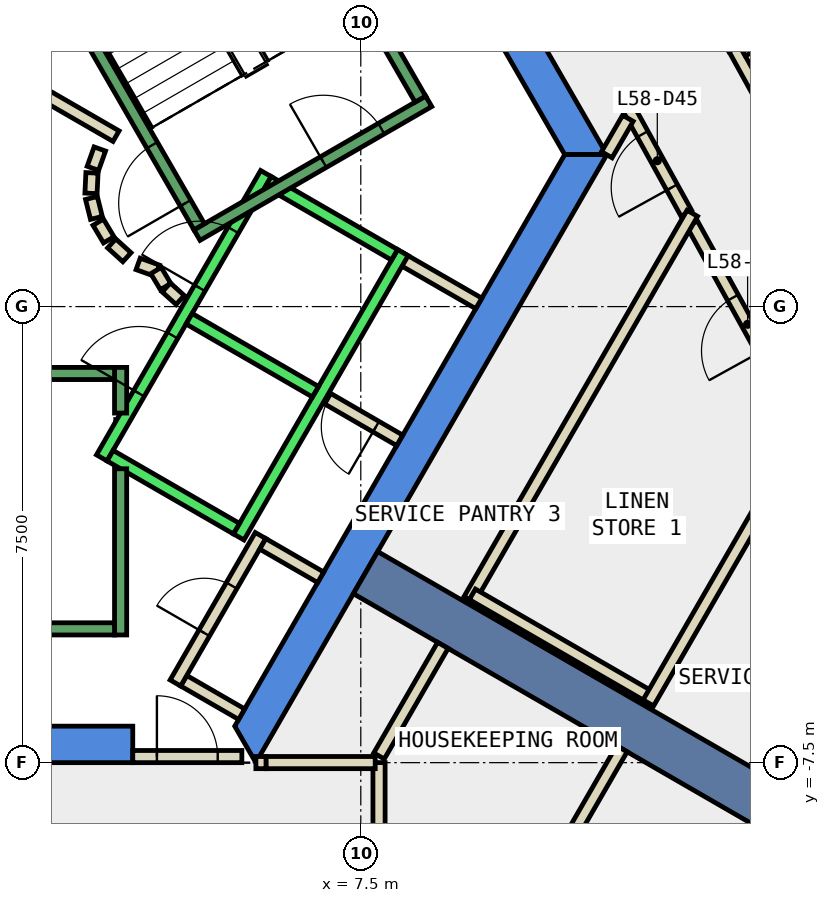
"""IFC4 building model, lengths in metres.
Left out: names, types, materials, properties, quantities, classifications, styles, units other than length and angle.
Written with IfcOpenShell. Run it as: python <this file> out.ifc"""

import sys

from ifc_helpers import new_model, si_unit, direction, frame, frame_2d, origin, place, context, subcontext, project, spatial, polyline, rectangle, outline, extrude, element, fill, save


model = new_model("IFC4")
c1 = context("Model", 3, precision=1e-05, world=origin(), true_north=direction((0.0, 1.0)))
c2 = subcontext(c1, "Body", "Model", "MODEL_VIEW")
j1 = project(units=[si_unit("LENGTHUNIT", "METRE"), si_unit("PLANEANGLEUNIT", "RADIAN")], contexts=[c1])
p1 = place(None, origin())
s1 = spatial("IfcSite", under=j1, at=p1, CompositionType="ELEMENT")
p2 = place(p1, origin())
s2 = spatial("IfcBuilding", under=s1, at=p2, CompositionType="ELEMENT")
p3 = place(p2, frame((0.0, 0.0, 255.8)))
s3 = spatial("IfcBuildingStorey", under=s2, at=p3, CompositionType="ELEMENT", Elevation=255.8)
p4 = place(p3, frame((0.0, 0.0, -0.34)))
e1 = element("IfcWall", 1, at=p4, inside=s3, PredefinedType="SHEAR", context=c2, shape_type="SweptSolid", body=[
    extrude(outline(polyline([(6.786, 10.747), (6.266, 10.447), (10.854, 2.5), (11.547, 2.5), (6.786, 10.747)])), origin(), (0.0, 0.0, 1.0), 3.6),
])
p5 = place(p3, frame((0.0, 0.0, -0.34)))
e2 = element("IfcWall", 2, at=p5, inside=s3, PredefinedType="SHEAR", context=c2, shape_type="SweptSolid", body=[
    extrude(outline(polyline([(3.75, -7.5), (3.75, -6.9), (-5.427, -6.9), (-5.774, -7.5), (3.75, -7.5)])), origin(), (0.0, 0.0, 1.0), 3.6),
])
p6 = place(p3, frame((0.0, 0.0, -0.34)))
e3 = element("IfcWall", 3, at=p6, inside=s3, PredefinedType="SHEAR", context=c2, shape_type="SweptSolid", body=[
    extrude(outline(polyline([(5.774, -7.5), (11.547, 2.5), (10.854, 2.5), (5.427, -6.9), (5.774, -7.5)])), origin(), (0.0, 0.0, 1.0), 3.6),
])
p7 = place(p3, frame((7.578, -4.375, -0.34), z_axis=(0.0, 0.0, 1.0), x_axis=(0.866024315419, -0.5000018851, 0.0)))
e4 = element("IfcWall", 4, at=p7, inside=s3, PredefinedType="SHEAR", context=c2, shape_type="SweptSolid", body=[
    extrude(rectangle(XDim=9.0, YDim=0.8, at=frame_2d((4.5, 0.0))), origin(), (0.0, 0.0, 1.0), 3.6),
])
p8 = place(p3, frame((12.854, 1.535, 0.0), z_axis=(0.0, 0.0, 1.0), x_axis=(-0.483730980407, 0.875216738068, 0.0)))
e5 = element("IfcWall", 5, at=p8, inside=s3, PredefinedType="PARTITIONING", context=c2, shape_type="SweptSolid", body=[
    extrude(rectangle(XDim=1.974, YDim=0.2, at=frame_2d((0.987, 0.0))), origin(), (0.0, 0.0, 1.0), 3.26),
])
p9 = place(p8, frame((0.487, 0.0, 0.0)))
e6 = element("IfcOpeningElement", 6, at=p9, cuts=e5, PredefinedType="OPENING", context=c2, shape_type="SweptSolid", body=[
    extrude(rectangle(XDim=1.0, YDim=2.1, at=frame_2d((0.5, 1.05))), frame((0.0, 0.11, 0.0), z_axis=(0.0, -1.0, 0.0), x_axis=(1.0, 0.0, 0.0)), (0.0, 0.0, 1.0), 0.22),
])
p10 = place(p3, frame((11.893, 3.097, 0.0), z_axis=(0.0, 0.0, 1.0), x_axis=(-0.500911294014, -0.865498628265, 0.0)))
e7 = element("IfcWall", 7, at=p10, inside=s3, PredefinedType="PARTITIONING", context=c2, shape_type="SweptSolid", body=[
    extrude(rectangle(XDim=0.693, YDim=0.2, at=frame_2d((0.347, 0.0))), origin(), (0.0, 0.0, 1.0), 3.26),
])
p11 = place(p3, frame((14.773, -1.941, 0.0), z_axis=(0.0, 0.0, 1.0), x_axis=(-0.483431586589, 0.875382145744, 0.0)))
e8 = element("IfcWall", 8, at=p11, inside=s3, PredefinedType="PARTITIONING", context=c2, shape_type="SweptSolid", body=[
    extrude(rectangle(XDim=3.771, YDim=0.2, at=frame_2d((1.885, 0.0))), origin(), (0.0, 0.0, 1.0), 3.26),
])
p12 = place(p11, frame((1.385, 0.0, 0.0)))
e9 = element("IfcOpeningElement", 9, at=p12, cuts=e8, PredefinedType="OPENING", context=c2, shape_type="SweptSolid", body=[
    extrude(rectangle(XDim=1.0, YDim=2.1, at=frame_2d((0.5, 1.05))), frame((0.0, 0.11, 0.0), z_axis=(0.0, -1.0, 0.0), x_axis=(1.0, 0.0, 0.0)), (0.0, 0.0, 1.0), 0.22),
])
p13 = place(p3, frame((13.641, 4.246, 0.0), z_axis=(0.0, 0.0, 1.0), x_axis=(0.483405752983, -0.875396411909, 0.0)))
e10 = element("IfcWall", 10, at=p13, inside=s3, PredefinedType="PARTITIONING", context=c2, shape_type="SweptSolid", body=[
    extrude(rectangle(XDim=4.284, YDim=0.2, at=frame_2d((2.142, 0.0))), origin(), (0.0, 0.0, 1.0), 3.26),
])
p14 = place(p13, frame((1.692, 0.0, 0.0)))
e11 = element("IfcOpeningElement", 11, at=p14, cuts=e10, PredefinedType="OPENING", context=c2, shape_type="SweptSolid", body=[
    extrude(rectangle(XDim=1.0, YDim=2.1, at=frame_2d((0.5, 1.05))), frame((0.0, 0.11, 0.0), z_axis=(0.0, -1.0, 0.0), x_axis=(1.0, 0.0, 0.0)), (0.0, 0.0, 1.0), 0.22),
])
p15 = place(p3, frame((5.541, -6.703, 0.0), z_axis=(0.0, 0.0, 1.0), x_axis=(-0.86621513555, 0.499671230855, 0.0)))
e12 = element("IfcWall", 12, at=p15, inside=s3, PredefinedType="PARTITIONING", context=c2, shape_type="SweptSolid", body=[
    extrude(rectangle(XDim=1.1, YDim=0.2, at=frame_2d((0.55, 0.0))), origin(), (0.0, 0.0, 1.0), 3.26),
])
p16 = place(p3, frame((4.451, -6.19, 0.0), z_axis=(0.0, 0.0, 1.0), x_axis=(0.500011755427, 0.866018616679, 0.0)))
e13 = element("IfcWall", 13, at=p16, inside=s3, PredefinedType="PARTITIONING", context=c2, shape_type="SweptSolid", body=[
    extrude(rectangle(XDim=2.8, YDim=0.2, at=frame_2d((1.4, 0.0))), origin(), (0.0, 0.0, 1.0), 3.26),
])
p17 = place(p16, frame((0.95, 0.0, 0.0)))
e14 = element("IfcOpeningElement", 14, at=p17, cuts=e13, PredefinedType="OPENING", context=c2, shape_type="SweptSolid", body=[
    extrude(rectangle(XDim=0.9, YDim=2.1, at=frame_2d((0.45, 1.05))), frame((0.0, 0.11, 0.0), z_axis=(0.0, -1.0, 0.0), x_axis=(1.0, 0.0, 0.0)), (0.0, 0.0, 1.0), 0.22),
])
p18 = place(p3, frame((5.888, -3.902, 0.0), z_axis=(0.0, 0.0, 1.0), x_axis=(0.86621513555, -0.499671230855, 0.0)))
e15 = element("IfcWall", 15, at=p18, inside=s3, PredefinedType="PARTITIONING", context=c2, shape_type="SweptSolid", body=[
    extrude(rectangle(XDim=1.1, YDim=0.2, at=frame_2d((0.55, 0.0))), origin(), (0.0, 0.0, 1.0), 3.26),
])
p19 = place(p3, frame((8.14, -2.2, 0.0), z_axis=(0.0, 0.0, 1.0), x_axis=(-0.865545166185, 0.500830874941, 0.0)))
e16 = element("IfcWall", 16, at=p19, inside=s3, PredefinedType="PARTITIONING", context=c2, shape_type="SweptSolid", body=[
    extrude(rectangle(XDim=1.5, YDim=0.2, at=frame_2d((0.75, 0.0))), origin(), (0.0, 0.0, 1.0), 3.26),
])
p20 = place(p19, frame((0.45, 0.0, 0.0)))
e17 = element("IfcOpeningElement", 17, at=p20, cuts=e16, PredefinedType="OPENING", context=c2, shape_type="SweptSolid", body=[
    extrude(rectangle(XDim=0.9, YDim=2.1, at=frame_2d((0.45, 1.05))), frame((0.0, 0.11, 0.0), z_axis=(0.0, -1.0, 0.0), x_axis=(1.0, 0.0, 0.0)), (0.0, 0.0, 1.0), 0.22),
])
p21 = place(p3, frame((8.141, 0.801, 0.0), z_axis=(0.0, 0.0, 1.0), x_axis=(0.866434738017, -0.499290341141, 0.0)))
e18 = element("IfcWall", 18, at=p21, inside=s3, PredefinedType="PARTITIONING", context=c2, shape_type="SweptSolid", body=[
    extrude(rectangle(XDim=1.5, YDim=0.2, at=frame_2d((0.75, 0.0))), origin(), (0.0, 0.0, 1.0), 3.26),
])
p22 = place(p3, frame((5.775, -7.499, 0.0), z_axis=(0.0, 0.0, 1.0), x_axis=(1.0, 0.0, 0.0)))
e19 = element("IfcWall", 19, at=p22, inside=s3, PredefinedType="PARTITIONING", context=c2, shape_type="SweptSolid", body=[
    extrude(rectangle(XDim=0.169, YDim=0.2, at=frame_2d((0.084, 0.0))), origin(), (0.0, 0.0, 1.0), 2.4),
])
p23 = place(p3, frame((7.8, -7.39, 0.0), z_axis=(0.0, 0.0, 1.0), x_axis=(0.499977374825, 0.866038466041, 0.0)))
e20 = element("IfcWall", 20, at=p23, inside=s3, PredefinedType="PARTITIONING", context=c2, shape_type="SweptSolid", body=[
    extrude(rectangle(XDim=2.1, YDim=0.2, at=frame_2d((1.05, 0.0))), origin(), (0.0, 0.0, 1.0), 3.26),
])
p24 = place(p3, frame((9.285, -4.818, 0.0), z_axis=(0.0, 0.0, 1.0), x_axis=(0.499962569651, 0.866047013128, 0.0)))
e21 = element("IfcWall", 21, at=p24, inside=s3, PredefinedType="PARTITIONING", context=c2, shape_type="SweptSolid", body=[
    extrude(rectangle(XDim=7.334, YDim=0.2, at=frame_2d((3.667, 0.0))), origin(), (0.0, 0.0, 1.0), 3.26),
])
p25 = place(p3, frame((1.866, 3.732, 0.0), z_axis=(0.0, 0.0, 1.0), x_axis=(0.866043361281, -0.499968895414, 0.0)))
e22 = element("IfcWall", 22, at=p25, inside=s3, PredefinedType="PARTITIONING", context=c2, shape_type="SweptSolid", body=[
    extrude(rectangle(XDim=1.858, YDim=0.2, at=frame_2d((0.929, 0.0))), origin(), (0.0, 0.0, 1.0), 3.26),
])
p26 = place(p3, frame((3.208, 2.592, 0.0), z_axis=(0.0, 0.0, 1.0), x_axis=(-0.337388820924, -0.941365382578, 0.0)))
e23 = element("IfcWall", 23, at=p26, inside=s3, PredefinedType="PARTITIONING", context=c2, shape_type="SweptSolid", body=[
    extrude(rectangle(XDim=0.338, YDim=0.2, at=frame_2d((0.169, 0.0))), origin(), (0.0, 0.0, 1.0), 3.26),
])
p27 = place(p3, frame((3.079, 2.199, 0.0), z_axis=(0.0, 0.0, 1.0), x_axis=(-0.047771483479, -0.998858290933, 0.0)))
e24 = element("IfcWall", 24, at=p27, inside=s3, PredefinedType="PARTITIONING", context=c2, shape_type="SweptSolid", body=[
    extrude(rectangle(XDim=0.337, YDim=0.2, at=frame_2d((0.169, 0.0))), origin(), (0.0, 0.0, 1.0), 3.26),
])
p28 = place(p3, frame((3.07, 1.786, 0.0), z_axis=(0.0, 0.0, 1.0), x_axis=(0.242705583207, -0.970099994784, 0.0)))
e25 = element("IfcWall", 25, at=p28, inside=s3, PredefinedType="PARTITIONING", context=c2, shape_type="SweptSolid", body=[
    extrude(rectangle(XDim=0.338, YDim=0.2, at=frame_2d((0.169, 0.0))), origin(), (0.0, 0.0, 1.0), 3.26),
])
for number, where, z_axis, x_axis in (
    (26, (3.182, 1.388, 0.0), (0.0, 0.0, 1.0), (0.512, -0.859, 0.0)),
    (27, (3.404, 1.039, 0.0), (0.0, 0.0, 1.0), (0.74, -0.672, 0.0)),
):
    element("IfcWall", number, at=place(p3, frame(where, z_axis=z_axis, x_axis=x_axis)), inside=s3, PredefinedType="PARTITIONING", context=c2, shape_type="SweptSolid", body=[
        extrude(rectangle(XDim=0.338, YDim=0.2, at=frame_2d((0.169, 0.0))), origin(), (0.0, 0.0, 1.0), 3.26),
    ])
p29 = place(p3, frame((3.838, 0.702, 0.0), z_axis=(0.0, 0.0, 1.0), x_axis=(0.941035081519, -0.338308993895, 0.0)))
e28 = element("IfcWall", 28, at=p29, inside=s3, PredefinedType="PARTITIONING", context=c2, shape_type="SweptSolid", body=[
    extrude(rectangle(XDim=0.337, YDim=0.2, at=frame_2d((0.168, 0.0))), origin(), (0.0, 0.0, 1.0), 3.26),
])
p30 = place(p3, frame((4.132, 0.593, 0.0), z_axis=(0.0, 0.0, 1.0), x_axis=(0.513561617048, -0.858052717201, 0.0)))
e29 = element("IfcWall", 29, at=p30, inside=s3, PredefinedType="PARTITIONING", context=c2, shape_type="SweptSolid", body=[
    extrude(rectangle(XDim=0.308, YDim=0.2, at=frame_2d((0.154, 0.0))), origin(), (0.0, 0.0, 1.0), 3.26),
])
p31 = place(p3, frame((4.301, 0.315, 0.0), z_axis=(0.0, 0.0, 1.0), x_axis=(0.741798017506, -0.670623367639, 0.0)))
e30 = element("IfcWall", 30, at=p31, inside=s3, PredefinedType="PARTITIONING", context=c2, shape_type="SweptSolid", body=[
    extrude(rectangle(XDim=0.309, YDim=0.2, at=frame_2d((0.154, 0.0))), origin(), (0.0, 0.0, 1.0), 3.26),
])
p32 = place(p3, frame((7.8, -7.499, 0.0), z_axis=(0.0, 0.0, 1.0), x_axis=(0.0, -1.0, 0.0)))
e31 = element("IfcWall", 31, at=p32, inside=s3, PredefinedType="PARTITIONING", context=c2, shape_type="SweptSolid", body=[
    extrude(rectangle(XDim=4.685, YDim=0.2, at=frame_2d((2.343, 0.0))), origin(), (0.0, 0.0, 1.0), 3.26),
])
p33 = place(p32, frame((1.842, 0.0, 0.0)))
e32 = element("IfcOpeningElement", 32, at=p33, cuts=e31, PredefinedType="OPENING", context=c2, shape_type="SweptSolid", body=[
    extrude(rectangle(XDim=1.0, YDim=2.1, at=frame_2d((0.5, 1.05))), frame((0.0, 0.11, 0.0), z_axis=(0.0, -1.0, 0.0), x_axis=(1.0, 0.0, 0.0)), (0.0, 0.0, 1.0), 0.22),
])
p34 = place(p3, frame((9.335, -4.732, 0.0), z_axis=(0.0, 0.0, 1.0), x_axis=(0.866002606077, -0.500039484709, 0.0)))
e33 = element("IfcWall", 33, at=p34, inside=s3, PredefinedType="PARTITIONING", context=c2, shape_type="SweptSolid", body=[
    extrude(rectangle(XDim=3.4, YDim=0.2, at=frame_2d((1.7, 0.0))), origin(), (0.0, 0.0, 1.0), 3.26),
])
p35 = place(p3, frame((11.794, -7.271, 0.0), z_axis=(0.0, 0.0, 1.0), x_axis=(-0.499918457185, -0.866072477433, 0.0)))
e34 = element("IfcWall", 34, at=p35, inside=s3, PredefinedType="PARTITIONING", context=c2, shape_type="SweptSolid", body=[
    extrude(rectangle(XDim=5.607, YDim=0.2, at=frame_2d((2.803, 0.0))), origin(), (0.0, 0.0, 1.0), 3.26),
])
p36 = place(p3, frame((14.871, -1.942, 0.0), z_axis=(0.0, 0.0, 1.0), x_axis=(-0.50000507839, -0.866022471755, 0.0)))
e35 = element("IfcWall", 35, at=p36, inside=s3, PredefinedType="PARTITIONING", context=c2, shape_type="SweptSolid", body=[
    extrude(rectangle(XDim=5.284, YDim=0.2, at=frame_2d((2.642, 0.0))), origin(), (0.0, 0.0, 1.0), 3.26),
])
p37 = place(p3, frame((13.776, 4.208, 0.0), z_axis=(0.0, 0.0, 1.0), x_axis=(0.870669592898, 0.491868336044, 0.0)))
e36 = element("IfcWall", 36, at=p37, inside=s3, PredefinedType="PARTITIONING", context=c2, shape_type="SweptSolid", body=[
    extrude(rectangle(XDim=2.3, YDim=0.2, at=frame_2d((1.15, 0.0))), origin(), (0.0, 0.0, 1.0), 3.26),
])
p38 = place(p3, frame((3.75, -7.4, 0.0), z_axis=(0.0, 0.0, 1.0), x_axis=(1.0, 0.0, 0.0)))
e37 = element("IfcWall", 37, at=p38, inside=s3, PredefinedType="PARTITIONING", context=c2, shape_type="SweptSolid", body=[
    extrude(rectangle(XDim=1.794, YDim=0.2, at=frame_2d((0.897, 0.0))), origin(), (0.0, 0.0, 1.0), 2.4),
])
p39 = place(p38, frame((0.397, 0.0, 0.0)))
e38 = element("IfcOpeningElement", 38, at=p39, cuts=e37, PredefinedType="OPENING", context=c2, shape_type="SweptSolid", body=[
    extrude(rectangle(XDim=1.0, YDim=2.1, at=frame_2d((0.5, 1.05))), frame((0.0, 0.11, 0.0), z_axis=(0.0, -1.0, 0.0), x_axis=(1.0, 0.0, 0.0)), (0.0, 0.0, 1.0), 0.22),
])
p40 = place(p3, frame((5.944, -7.499, 0.0), z_axis=(0.0, 0.0, 1.0), x_axis=(1.0, 0.0, 0.0)))
e39 = element("IfcWall", 39, at=p40, inside=s3, PredefinedType="PARTITIONING", context=c2, shape_type="SweptSolid", body=[
    extrude(rectangle(XDim=1.793, YDim=0.2, at=frame_2d((0.896, 0.0))), origin(), (0.0, 0.0, 1.0), 3.26),
])
p41 = place(p3, frame((3.24, -2.488, 0.0), z_axis=(0.0, 0.0, 1.0), x_axis=(0.500034260056, 0.866005622828, 0.0)))
e40 = element("IfcWall", 40, at=p41, inside=s3, PredefinedType="STANDARD", context=c2, shape_type="SweptSolid", body=[
    extrude(rectangle(XDim=5.399, YDim=0.2, at=frame_2d((2.7, 0.0))), origin(), (0.0, 0.0, 1.0), 3.26),
])
p42 = place(p41, frame((3.225, 0.0, 0.0)))
e41 = element("IfcOpeningElement", 41, at=p42, cuts=e40, PredefinedType="OPENING", context=c2, shape_type="SweptSolid", body=[
    extrude(rectangle(XDim=1.1, YDim=2.1, at=frame_2d((0.55, 1.05))), frame((0.0, 0.11, 0.0), z_axis=(0.0, -1.0, 0.0), x_axis=(1.0, 0.0, 0.0)), (0.0, 0.0, 1.0), 0.22),
])
p43 = place(p41, frame((1.225, 0.0, 0.0)))
e42 = element("IfcOpeningElement", 42, at=p43, cuts=e40, PredefinedType="OPENING", context=c2, shape_type="SweptSolid", body=[
    extrude(rectangle(XDim=1.1, YDim=2.1, at=frame_2d((0.55, 1.05))), frame((0.0, 0.11, 0.0), z_axis=(0.0, -1.0, 0.0), x_axis=(1.0, 0.0, 0.0)), (0.0, 0.0, 1.0), 0.22),
])
p44 = place(p3, frame((5.492, -3.788, 0.0), z_axis=(0.0, 0.0, 1.0), x_axis=(0.500034260056, 0.866005622828, 0.0)))
e43 = element("IfcWall", 43, at=p44, inside=s3, PredefinedType="STANDARD", context=c2, shape_type="SweptSolid", body=[
    extrude(rectangle(XDim=5.399, YDim=0.2, at=frame_2d((2.7, 0.0))), origin(), (0.0, 0.0, 1.0), 3.26),
])
p45 = place(p3, frame((3.377, -2.452, 0.0), z_axis=(0.0, 0.0, 1.0), x_axis=(0.865955154139, -0.50012165622, 0.0)))
e44 = element("IfcWall", 44, at=p45, inside=s3, PredefinedType="STANDARD", context=c2, shape_type="SweptSolid", body=[
    extrude(rectangle(XDim=2.4, YDim=0.2, at=frame_2d((1.2, 0.0))), origin(), (0.0, 0.0, 1.0), 3.26),
])
for number, where, z_axis, x_axis in (
    (45, (4.677, -0.2, 0.0), (0.0, 0.0, 1.0), (0.866, -0.5, 0.0)),
    (46, (5.977, 2.052, 0.0), (0.0, 0.0, 1.0), (0.866, -0.5, 0.0)),
):
    element("IfcWall", number, at=place(p3, frame(where, z_axis=z_axis, x_axis=x_axis)), inside=s3, PredefinedType="STANDARD", context=c2, shape_type="SweptSolid", body=[
        extrude(rectangle(XDim=2.399, YDim=0.2, at=frame_2d((1.2, 0.0))), origin(), (0.0, 0.0, 1.0), 3.26),
    ])
p46 = place(p3, frame((3.55, -2.667, 0.0), z_axis=(0.0, 0.0, 1.0), x_axis=(0.0, -1.0, 0.0)))
e47 = element("IfcWall", 47, at=p46, inside=s3, PredefinedType="STANDARD", context=c2, shape_type="SweptSolid", body=[
    extrude(rectangle(XDim=2.733, YDim=0.2, at=frame_2d((1.366, 0.0))), origin(), (0.0, 0.0, 1.0), 3.26),
])
p47 = place(p3, frame((3.55, -1.0, 0.0), z_axis=(0.0, 0.0, 1.0), x_axis=(0.0, -1.0, 0.0)))
e48 = element("IfcWall", 48, at=p47, inside=s3, PredefinedType="STANDARD", context=c2, shape_type="SweptSolid", body=[
    extrude(rectangle(XDim=0.751, YDim=0.2, at=frame_2d((0.375, 0.0))), origin(), (0.0, 0.0, 1.0), 3.26),
])
p48 = place(p3, frame((-3.45, -1.1, 0.0), z_axis=(0.0, 0.0, 1.0), x_axis=(1.0, 0.0, 0.0)))
e49 = element("IfcWall", 49, at=p48, inside=s3, PredefinedType="STANDARD", context=c2, shape_type="SweptSolid", body=[
    extrude(rectangle(XDim=6.9, YDim=0.2, at=frame_2d((3.45, 0.0))), origin(), (0.0, 0.0, 1.0), 3.26),
])
p49 = place(p48, frame((0.45, 0.0, 0.0)))
e50 = element("IfcOpeningElement", 50, at=p49, cuts=e49, PredefinedType="OPENING", context=c2, shape_type="SweptSolid", body=[
    extrude(rectangle(XDim=1.1, YDim=2.2, at=frame_2d((0.55, 1.1))), frame((0.0, 0.11, 0.0), z_axis=(0.0, -1.0, 0.0), x_axis=(1.0, 0.0, 0.0)), (0.0, 0.0, 1.0), 0.22),
])
p50 = place(p3, frame((-3.45, -5.3, 0.0), z_axis=(0.0, 0.0, 1.0), x_axis=(1.0, 0.0, 0.0)))
e51 = element("IfcWall", 51, at=p50, inside=s3, PredefinedType="STANDARD", context=c2, shape_type="SweptSolid", body=[
    extrude(rectangle(XDim=6.9, YDim=0.2, at=frame_2d((3.45, 0.0))), origin(), (0.0, 0.0, 1.0), 3.26),
])
p51 = place(p3, frame((4.806, 1.176, 0.0), z_axis=(0.0, 0.0, 1.0), x_axis=(0.866059941101, 0.499940174841, 0.0)))
e52 = element("IfcWall", 52, at=p51, inside=s3, PredefinedType="STANDARD", context=c2, shape_type="SweptSolid", body=[
    extrude(rectangle(XDim=4.4, YDim=0.2, at=frame_2d((2.2, 0.0))), origin(), (0.0, 0.0, 1.0), 3.26),
])
p52 = place(p51, frame((2.4, 0.0, 0.0)))
e53 = element("IfcOpeningElement", 53, at=p52, cuts=e52, PredefinedType="OPENING", context=c2, shape_type="SweptSolid", body=[
    extrude(rectangle(XDim=1.1, YDim=2.2, at=frame_2d((0.55, 1.1))), frame((0.0, 0.11, 0.0), z_axis=(0.0, -1.0, 0.0), x_axis=(1.0, 0.0, 0.0)), (0.0, 0.0, 1.0), 0.22),
])
p53 = place(p3, frame((4.843, 1.312, 0.0), z_axis=(0.0, 0.0, 1.0), x_axis=(-0.499963383562, 0.866046543262, 0.0)))
e54 = element("IfcWall", 54, at=p53, inside=s3, PredefinedType="STANDARD", context=c2, shape_type="SweptSolid", body=[
    extrude(rectangle(XDim=6.9, YDim=0.2, at=frame_2d((3.45, 0.0))), origin(), (0.0, 0.0, 1.0), 3.26),
])
p54 = place(p53, frame((0.45, 0.0, 0.0)))
e55 = element("IfcOpeningElement", 55, at=p54, cuts=e54, PredefinedType="OPENING", context=c2, shape_type="SweptSolid", body=[
    extrude(rectangle(XDim=1.1, YDim=2.2, at=frame_2d((0.55, 1.1))), frame((0.0, 0.11, 0.0), z_axis=(0.0, -1.0, 0.0), x_axis=(1.0, 0.0, 0.0)), (0.0, 0.0, 1.0), 0.22),
])
p55 = place(p3, frame((8.48, 3.412, 0.0), z_axis=(0.0, 0.0, 1.0), x_axis=(-0.499978703459, 0.866037698999, 0.0)))
e56 = element("IfcWall", 56, at=p55, inside=s3, PredefinedType="STANDARD", context=c2, shape_type="SweptSolid", body=[
    extrude(rectangle(XDim=6.9, YDim=0.2, at=frame_2d((3.45, 0.0))), origin(), (0.0, 0.0, 1.0), 3.26),
])
p56 = place(p12, origin())
e57 = element("IfcDoor", 57, at=p56, inside=s3, OperationType="SINGLE_SWING_LEFT", PredefinedType="DOOR", context=c2, shape_type="SweptSolid", body=[
    extrude(rectangle(XDim=1.0, YDim=2.1, at=frame_2d((0.5, 1.05))), frame((0.0, 0.025, 0.0), z_axis=(0.0, -1.0, 0.0), x_axis=(1.0, 0.0, 0.0)), (0.0, 0.0, 1.0), 0.05),
])
fill(e9, e57)
p57 = place(p9, origin())
e58 = element("IfcDoor", 58, at=p57, inside=s3, OperationType="SINGLE_SWING_LEFT", PredefinedType="DOOR", context=c2, shape_type="SweptSolid", body=[
    extrude(rectangle(XDim=1.0, YDim=2.1, at=frame_2d((0.5, 1.05))), frame((0.0, 0.025, 0.0), z_axis=(0.0, -1.0, 0.0), x_axis=(1.0, 0.0, 0.0)), (0.0, 0.0, 1.0), 0.05),
])
fill(e6, e58)
p58 = place(p17, origin())
e59 = element("IfcDoor", 59, at=p58, inside=s3, OperationType="SINGLE_SWING_LEFT", PredefinedType="DOOR", context=c2, shape_type="SweptSolid", body=[
    extrude(rectangle(XDim=0.9, YDim=2.1, at=frame_2d((0.45, 1.05))), frame((0.0, 0.025, 0.0), z_axis=(0.0, -1.0, 0.0), x_axis=(1.0, 0.0, 0.0)), (0.0, 0.0, 1.0), 0.05),
])
fill(e14, e59)
p59 = place(p20, origin())
e60 = element("IfcDoor", 60, at=p59, inside=s3, OperationType="SINGLE_SWING_LEFT", PredefinedType="DOOR", context=c2, shape_type="SweptSolid", body=[
    extrude(rectangle(XDim=0.9, YDim=2.1, at=frame_2d((0.45, 1.05))), frame((0.0, 0.025, 0.0), z_axis=(0.0, -1.0, 0.0), x_axis=(1.0, 0.0, 0.0)), (0.0, 0.0, 1.0), 0.05),
])
fill(e17, e60)
p60 = place(p39, origin())
e61 = element("IfcDoor", 61, at=p60, inside=s3, OperationType="SINGLE_SWING_LEFT", PredefinedType="DOOR", context=c2, shape_type="SweptSolid", body=[
    extrude(rectangle(XDim=1.0, YDim=2.1, at=frame_2d((0.5, 1.05))), frame((0.0, 0.025, 0.0), z_axis=(0.0, -1.0, 0.0), x_axis=(1.0, 0.0, 0.0)), (0.0, 0.0, 1.0), 0.05),
])
fill(e38, e61)
p61 = place(p42, origin())
e62 = element("IfcDoor", 62, at=p61, inside=s3, OperationType="SLIDING_TO_LEFT", PredefinedType="DOOR", context=c2, shape_type="SweptSolid", body=[
    extrude(rectangle(XDim=1.1, YDim=2.1, at=frame_2d((0.55, 1.05))), frame((0.0, 0.025, 0.0), z_axis=(0.0, -1.0, 0.0), x_axis=(1.0, 0.0, 0.0)), (0.0, 0.0, 1.0), 0.05),
])
fill(e41, e62)
p62 = place(p43, origin())
e63 = element("IfcDoor", 63, at=p62, inside=s3, OperationType="SLIDING_TO_LEFT", PredefinedType="DOOR", context=c2, shape_type="SweptSolid", body=[
    extrude(rectangle(XDim=1.1, YDim=2.1, at=frame_2d((0.55, 1.05))), frame((0.0, 0.025, 0.0), z_axis=(0.0, -1.0, 0.0), x_axis=(1.0, 0.0, 0.0)), (0.0, 0.0, 1.0), 0.05),
])
fill(e42, e63)
p63 = place(p54, origin())
e64 = element("IfcDoor", 64, at=p63, inside=s3, OperationType="SINGLE_SWING_LEFT", PredefinedType="DOOR", context=c2, shape_type="SweptSolid", body=[
    extrude(rectangle(XDim=1.1, YDim=2.2, at=frame_2d((0.55, 1.1))), frame((0.0, 0.025, 0.0), z_axis=(0.0, -1.0, 0.0), x_axis=(1.0, 0.0, 0.0)), (0.0, 0.0, 1.0), 0.05),
])
fill(e55, e64)
p64 = place(p52, origin())
e65 = element("IfcDoor", 65, at=p64, inside=s3, OperationType="SINGLE_SWING_LEFT", PredefinedType="DOOR", context=c2, shape_type="SweptSolid", body=[
    extrude(rectangle(XDim=1.1, YDim=2.2, at=frame_2d((0.55, 1.1))), frame((0.0, 0.025, 0.0), z_axis=(0.0, -1.0, 0.0), x_axis=(1.0, 0.0, 0.0)), (0.0, 0.0, 1.0), 0.05),
])
fill(e53, e65)
save(model, sys.argv[1])
